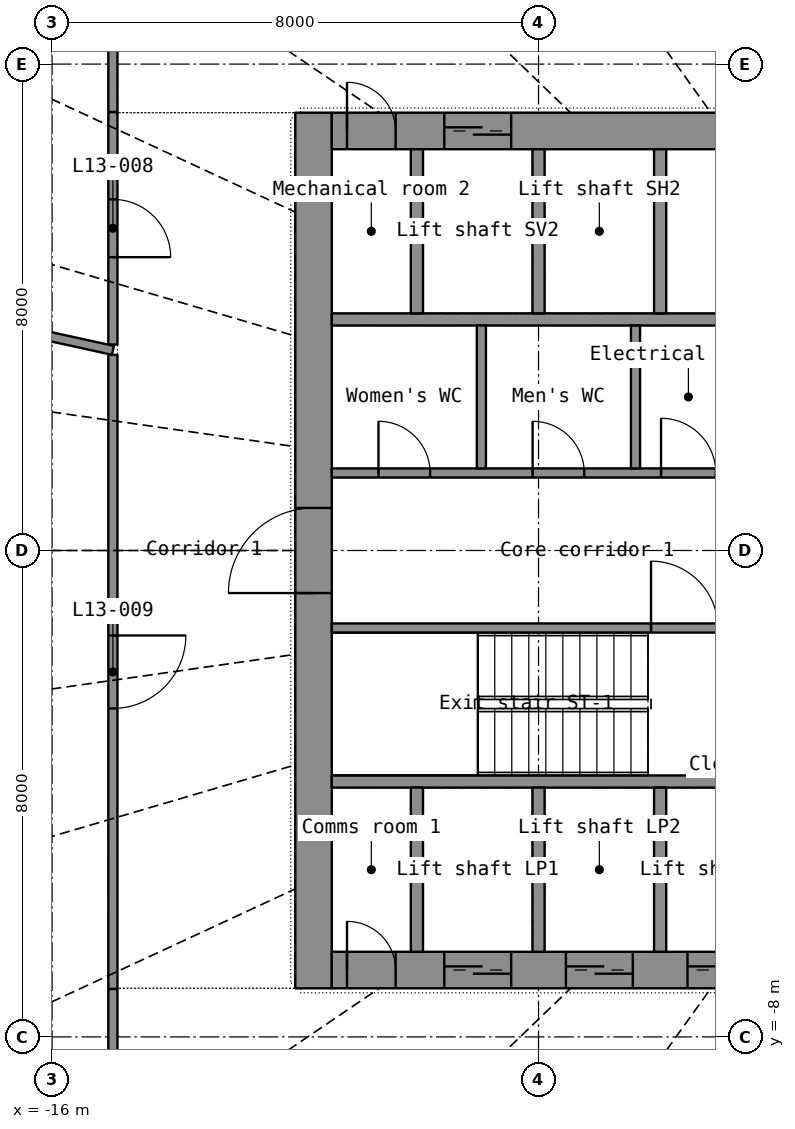
"""IFC4 building model, lengths in metres.
Left out: names, types, materials, properties, quantities, classifications, styles, units other than length and angle.
Written with IfcOpenShell. Run it as: python <this file> out.ifc"""

import sys

from ifc_helpers import new_model, si_unit, direction, frame, frame_2d, origin, place, context, subcontext, project, spatial, rectangle, extrude, element, fill, save


model = new_model("IFC4")
c1 = context("Model", 3, precision=1e-05, world=origin(), true_north=direction((0.0, 1.0)))
c2 = subcontext(c1, "Body", "Model", "MODEL_VIEW")
j1 = project(units=[si_unit("LENGTHUNIT", "METRE"), si_unit("PLANEANGLEUNIT", "RADIAN")], contexts=[c1])
p1 = place(None, origin())
s1 = spatial("IfcSite", under=j1, at=p1, CompositionType="ELEMENT")
p2 = place(p1, origin())
s2 = spatial("IfcBuilding", under=s1, at=p2, CompositionType="ELEMENT")
p3 = place(p2, frame((0.0, 0.0, 59.3)))
s3 = spatial("IfcBuildingStorey", under=s2, at=p3, CompositionType="ELEMENT", Elevation=59.3)
p4 = place(p3, frame((-11.7, -7.2, 0.0), z_axis=(0.0, 0.0, 1.0), x_axis=(0.0, 1.0, 0.0)))
e1 = element("IfcWall", 1, at=p4, inside=s3, PredefinedType="SHEAR", context=c2, shape_type="SweptSolid", body=[
    extrude(rectangle(XDim=14.4, YDim=0.6, at=frame_2d((7.2, 0.0))), origin(), (0.0, 0.0, 1.0), 3.3),
])
p5 = place(p4, frame((6.5, 0.0, 0.0)))
e2 = element("IfcOpeningElement", 2, at=p5, cuts=e1, PredefinedType="OPENING", context=c2, shape_type="SweptSolid", body=[
    extrude(rectangle(XDim=1.4, YDim=2.2, at=frame_2d((0.7, 1.1))), frame((0.0, 0.31, 0.0), z_axis=(0.0, -1.0, 0.0), x_axis=(1.0, 0.0, 0.0)), (0.0, 0.0, 1.0), 0.62),
])
p6 = place(p3, frame((-11.4, -6.9, 0.0), z_axis=(0.0, 0.0, 1.0), x_axis=(1.0, 0.0, 0.0)))
e3 = element("IfcWall", 3, at=p6, inside=s3, PredefinedType="SHEAR", context=c2, shape_type="SweptSolid", body=[
    extrude(rectangle(XDim=22.8, YDim=0.6, at=frame_2d((11.4, 0.0))), origin(), (0.0, 0.0, 1.0), 3.3),
])
p7 = place(p6, frame((1.85, 0.0, 0.0)))
e4 = element("IfcOpeningElement", 4, at=p7, cuts=e3, PredefinedType="OPENING", context=c2, shape_type="SweptSolid", body=[
    extrude(rectangle(XDim=1.1, YDim=2.2, at=frame_2d((0.55, 1.1))), frame((0.0, 0.31, 0.0), z_axis=(0.0, -1.0, 0.0), x_axis=(1.0, 0.0, 0.0)), (0.0, 0.0, 1.0), 0.62),
])
p8 = place(p6, frame((3.85, 0.0, 0.0)))
e5 = element("IfcOpeningElement", 5, at=p8, cuts=e3, PredefinedType="OPENING", context=c2, shape_type="SweptSolid", body=[
    extrude(rectangle(XDim=1.1, YDim=2.2, at=frame_2d((0.55, 1.1))), frame((0.0, 0.31, 0.0), z_axis=(0.0, -1.0, 0.0), x_axis=(1.0, 0.0, 0.0)), (0.0, 0.0, 1.0), 0.62),
])
p9 = place(p6, frame((5.85, 0.0, 0.0)))
e6 = element("IfcOpeningElement", 6, at=p9, cuts=e3, PredefinedType="OPENING", context=c2, shape_type="SweptSolid", body=[
    extrude(rectangle(XDim=1.1, YDim=2.2, at=frame_2d((0.55, 1.1))), frame((0.0, 0.31, 0.0), z_axis=(0.0, -1.0, 0.0), x_axis=(1.0, 0.0, 0.0)), (0.0, 0.0, 1.0), 0.62),
])
p10 = place(p6, frame((7.85, 0.0, 0.0)))
e7 = element("IfcOpeningElement", 7, at=p10, cuts=e3, PredefinedType="OPENING", context=c2, shape_type="SweptSolid", body=[
    extrude(rectangle(XDim=1.1, YDim=2.2, at=frame_2d((0.55, 1.1))), frame((0.0, 0.31, 0.0), z_axis=(0.0, -1.0, 0.0), x_axis=(1.0, 0.0, 0.0)), (0.0, 0.0, 1.0), 0.62),
])
p11 = place(p6, frame((9.85, 0.0, 0.0)))
e8 = element("IfcOpeningElement", 8, at=p11, cuts=e3, PredefinedType="OPENING", context=c2, shape_type="SweptSolid", body=[
    extrude(rectangle(XDim=1.1, YDim=2.2, at=frame_2d((0.55, 1.1))), frame((0.0, 0.31, 0.0), z_axis=(0.0, -1.0, 0.0), x_axis=(1.0, 0.0, 0.0)), (0.0, 0.0, 1.0), 0.62),
])
p12 = place(p6, frame((11.85, 0.0, 0.0)))
e9 = element("IfcOpeningElement", 9, at=p12, cuts=e3, PredefinedType="OPENING", context=c2, shape_type="SweptSolid", body=[
    extrude(rectangle(XDim=1.1, YDim=2.2, at=frame_2d((0.55, 1.1))), frame((0.0, 0.31, 0.0), z_axis=(0.0, -1.0, 0.0), x_axis=(1.0, 0.0, 0.0)), (0.0, 0.0, 1.0), 0.62),
])
p13 = place(p6, frame((13.85, 0.0, 0.0)))
e10 = element("IfcOpeningElement", 10, at=p13, cuts=e3, PredefinedType="OPENING", context=c2, shape_type="SweptSolid", body=[
    extrude(rectangle(XDim=1.1, YDim=2.2, at=frame_2d((0.55, 1.1))), frame((0.0, 0.31, 0.0), z_axis=(0.0, -1.0, 0.0), x_axis=(1.0, 0.0, 0.0)), (0.0, 0.0, 1.0), 0.62),
])
p14 = place(p6, frame((15.85, 0.0, 0.0)))
e11 = element("IfcOpeningElement", 11, at=p14, cuts=e3, PredefinedType="OPENING", context=c2, shape_type="SweptSolid", body=[
    extrude(rectangle(XDim=1.1, YDim=2.2, at=frame_2d((0.55, 1.1))), frame((0.0, 0.31, 0.0), z_axis=(0.0, -1.0, 0.0), x_axis=(1.0, 0.0, 0.0)), (0.0, 0.0, 1.0), 0.62),
])
p15 = place(p6, frame((19.85, 0.0, 0.0)))
e12 = element("IfcOpeningElement", 12, at=p15, cuts=e3, PredefinedType="OPENING", context=c2, shape_type="SweptSolid", body=[
    extrude(rectangle(XDim=1.1, YDim=2.2, at=frame_2d((0.55, 1.1))), frame((0.0, 0.31, 0.0), z_axis=(0.0, -1.0, 0.0), x_axis=(1.0, 0.0, 0.0)), (0.0, 0.0, 1.0), 0.62),
])
p16 = place(p6, frame((0.25, 0.0, 0.0)))
e13 = element("IfcOpeningElement", 13, at=p16, cuts=e3, PredefinedType="OPENING", context=c2, shape_type="SweptSolid", body=[
    extrude(rectangle(XDim=0.8, YDim=2.05, at=frame_2d((0.4, 1.025))), frame((0.0, 0.31, 0.0), z_axis=(0.0, -1.0, 0.0), x_axis=(1.0, 0.0, 0.0)), (0.0, 0.0, 1.0), 0.62),
])
p17 = place(p6, frame((21.75, 0.0, 0.0)))
e14 = element("IfcOpeningElement", 14, at=p17, cuts=e3, PredefinedType="OPENING", context=c2, shape_type="SweptSolid", body=[
    extrude(rectangle(XDim=0.8, YDim=2.05, at=frame_2d((0.4, 1.025))), frame((0.0, 0.31, 0.0), z_axis=(0.0, -1.0, 0.0), x_axis=(1.0, 0.0, 0.0)), (0.0, 0.0, 1.0), 0.62),
])
p18 = place(p3, frame((-11.4, 6.9, 0.0), z_axis=(0.0, 0.0, 1.0), x_axis=(1.0, 0.0, 0.0)))
e15 = element("IfcWall", 15, at=p18, inside=s3, PredefinedType="SHEAR", context=c2, shape_type="SweptSolid", body=[
    extrude(rectangle(XDim=22.8, YDim=0.6, at=frame_2d((11.4, 0.0))), origin(), (0.0, 0.0, 1.0), 3.3),
])
p19 = place(p18, frame((1.85, 0.0, 0.0)))
e16 = element("IfcOpeningElement", 16, at=p19, cuts=e15, PredefinedType="OPENING", context=c2, shape_type="SweptSolid", body=[
    extrude(rectangle(XDim=1.1, YDim=2.2, at=frame_2d((0.55, 1.1))), frame((0.0, 0.31, 0.0), z_axis=(0.0, -1.0, 0.0), x_axis=(1.0, 0.0, 0.0)), (0.0, 0.0, 1.0), 0.62),
])
p20 = place(p18, frame((8.95, 0.0, 0.0)))
e17 = element("IfcOpeningElement", 17, at=p20, cuts=e15, PredefinedType="OPENING", context=c2, shape_type="SweptSolid", body=[
    extrude(rectangle(XDim=0.9, YDim=2.1, at=frame_2d((0.45, 1.05))), frame((0.0, 0.31, 0.0), z_axis=(0.0, -1.0, 0.0), x_axis=(1.0, 0.0, 0.0)), (0.0, 0.0, 1.0), 0.62),
])
p21 = place(p18, frame((14.95, 0.0, 0.0)))
e18 = element("IfcOpeningElement", 18, at=p21, cuts=e15, PredefinedType="OPENING", context=c2, shape_type="SweptSolid", body=[
    extrude(rectangle(XDim=0.9, YDim=2.1, at=frame_2d((0.45, 1.05))), frame((0.0, 0.31, 0.0), z_axis=(0.0, -1.0, 0.0), x_axis=(1.0, 0.0, 0.0)), (0.0, 0.0, 1.0), 0.62),
])
p22 = place(p18, frame((18.95, 0.0, 0.0)))
e19 = element("IfcOpeningElement", 19, at=p22, cuts=e15, PredefinedType="OPENING", context=c2, shape_type="SweptSolid", body=[
    extrude(rectangle(XDim=0.9, YDim=2.1, at=frame_2d((0.45, 1.05))), frame((0.0, 0.31, 0.0), z_axis=(0.0, -1.0, 0.0), x_axis=(1.0, 0.0, 0.0)), (0.0, 0.0, 1.0), 0.62),
])
p23 = place(p18, frame((0.25, 0.0, 0.0)))
e20 = element("IfcOpeningElement", 20, at=p23, cuts=e15, PredefinedType="OPENING", context=c2, shape_type="SweptSolid", body=[
    extrude(rectangle(XDim=0.8, YDim=2.05, at=frame_2d((0.4, 1.025))), frame((0.0, 0.31, 0.0), z_axis=(0.0, -1.0, 0.0), x_axis=(1.0, 0.0, 0.0)), (0.0, 0.0, 1.0), 0.62),
])
p24 = place(p18, frame((21.75, 0.0, 0.0)))
e21 = element("IfcOpeningElement", 21, at=p24, cuts=e15, PredefinedType="OPENING", context=c2, shape_type="SweptSolid", body=[
    extrude(rectangle(XDim=0.8, YDim=2.05, at=frame_2d((0.4, 1.025))), frame((0.0, 0.31, 0.0), z_axis=(0.0, -1.0, 0.0), x_axis=(1.0, 0.0, 0.0)), (0.0, 0.0, 1.0), 0.62),
])
for number, where, z_axis, x_axis in (
    (22, (-11.4, -3.8, 0.0), (0.0, 0.0, 1.0), (1.0, 0.0, 0.0)),
    (23, (-11.4, 3.8, 0.0), (0.0, 0.0, 1.0), (1.0, 0.0, 0.0)),
):
    element("IfcWall", number, at=place(p3, frame(where, z_axis=z_axis, x_axis=x_axis)), inside=s3, PredefinedType="SHEAR", context=c2, shape_type="SweptSolid", body=[
        extrude(rectangle(XDim=22.8, YDim=0.2, at=frame_2d((11.4, 0.0))), origin(), (0.0, 0.0, 1.0), 3.3),
    ])
for number, where, z_axis, x_axis in (
    (24, (-10.0, -6.6, 0.0), (0.0, 0.0, 1.0), (0.0, 1.0, 0.0)),
    (25, (-8.0, -6.6, 0.0), (0.0, 0.0, 1.0), (0.0, 1.0, 0.0)),
    (26, (-6.0, -6.6, 0.0), (0.0, 0.0, 1.0), (0.0, 1.0, 0.0)),
    (27, (-10.0, 3.9, 0.0), (0.0, 0.0, 1.0), (0.0, 1.0, 0.0)),
    (28, (-8.0, 3.9, 0.0), (0.0, 0.0, 1.0), (0.0, 1.0, 0.0)),
    (29, (-6.0, 3.9, 0.0), (0.0, 0.0, 1.0), (0.0, 1.0, 0.0)),
):
    element("IfcWall", number, at=place(p3, frame(where, z_axis=z_axis, x_axis=x_axis)), inside=s3, PredefinedType="SHEAR", context=c2, shape_type="SweptSolid", body=[
        extrude(rectangle(XDim=2.7, YDim=0.2, at=frame_2d((1.35, 0.0))), origin(), (0.0, 0.0, 1.0), 3.3),
    ])
p25 = place(p3, frame((-11.4, -1.275, 0.0), z_axis=(0.0, 0.0, 1.0), x_axis=(1.0, 0.0, 0.0)))
e30 = element("IfcWall", 30, at=p25, inside=s3, PredefinedType="SHEAR", context=c2, shape_type="SweptSolid", body=[
    extrude(rectangle(XDim=8.4, YDim=0.15, at=frame_2d((4.2, 0.0))), origin(), (0.0, 0.0, 1.0), 3.3),
])
p26 = place(p25, frame((5.25, 0.0, 0.0)))
e31 = element("IfcOpeningElement", 31, at=p26, cuts=e30, PredefinedType="OPENING", context=c2, shape_type="SweptSolid", body=[
    extrude(rectangle(XDim=1.1, YDim=2.15, at=frame_2d((0.55, 1.075))), frame((0.0, 0.085, 0.0), z_axis=(0.0, -1.0, 0.0), x_axis=(1.0, 0.0, 0.0)), (0.0, 0.0, 1.0), 0.17),
])
p27 = place(p25, frame((7.05, 0.0, 0.0)))
e32 = element("IfcOpeningElement", 32, at=p27, cuts=e30, PredefinedType="OPENING", context=c2, shape_type="SweptSolid", body=[
    extrude(rectangle(XDim=0.9, YDim=2.1, at=frame_2d((0.45, 1.05))), frame((0.0, 0.085, 0.0), z_axis=(0.0, -1.0, 0.0), x_axis=(1.0, 0.0, 0.0)), (0.0, 0.0, 1.0), 0.17),
])
p28 = place(p3, frame((-11.4, 1.275, 0.0), z_axis=(0.0, 0.0, 1.0), x_axis=(1.0, 0.0, 0.0)))
e33 = element("IfcWall", 33, at=p28, inside=s3, PredefinedType="PARTITIONING", context=c2, shape_type="SweptSolid", body=[
    extrude(rectangle(XDim=8.4, YDim=0.15, at=frame_2d((4.2, 0.0))), origin(), (0.0, 0.0, 1.0), 3.3),
])
p29 = place(p28, frame((0.768, 0.0, 0.0)))
e34 = element("IfcOpeningElement", 34, at=p29, cuts=e33, PredefinedType="OPENING", context=c2, shape_type="SweptSolid", body=[
    extrude(rectangle(XDim=0.85, YDim=2.1, at=frame_2d((0.425, 1.05))), frame((0.0, 0.085, 0.0), z_axis=(0.0, -1.0, 0.0), x_axis=(1.0, 0.0, 0.0)), (0.0, 0.0, 1.0), 0.17),
])
p30 = place(p28, frame((3.302, 0.0, 0.0)))
e35 = element("IfcOpeningElement", 35, at=p30, cuts=e33, PredefinedType="OPENING", context=c2, shape_type="SweptSolid", body=[
    extrude(rectangle(XDim=0.85, YDim=2.1, at=frame_2d((0.425, 1.05))), frame((0.0, 0.085, 0.0), z_axis=(0.0, -1.0, 0.0), x_axis=(1.0, 0.0, 0.0)), (0.0, 0.0, 1.0), 0.17),
])
p31 = place(p28, frame((5.415, 0.0, 0.0)))
e36 = element("IfcOpeningElement", 36, at=p31, cuts=e33, PredefinedType="OPENING", context=c2, shape_type="SweptSolid", body=[
    extrude(rectangle(XDim=0.9, YDim=2.1, at=frame_2d((0.45, 1.05))), frame((0.0, 0.085, 0.0), z_axis=(0.0, -1.0, 0.0), x_axis=(1.0, 0.0, 0.0)), (0.0, 0.0, 1.0), 0.17),
])
p32 = place(p28, frame((7.155, 0.0, 0.0)))
e37 = element("IfcOpeningElement", 37, at=p32, cuts=e33, PredefinedType="OPENING", context=c2, shape_type="SweptSolid", body=[
    extrude(rectangle(XDim=0.9, YDim=2.1, at=frame_2d((0.45, 1.05))), frame((0.0, 0.085, 0.0), z_axis=(0.0, -1.0, 0.0), x_axis=(1.0, 0.0, 0.0)), (0.0, 0.0, 1.0), 0.17),
])
for number, where, z_axis, x_axis in (
    (38, (-8.94, 1.35, 0.0), (0.0, 0.0, 1.0), (0.0, 1.0, 0.0)),
    (39, (-6.405, 1.35, 0.0), (0.0, 0.0, 1.0), (0.0, 1.0, 0.0)),
):
    element("IfcWall", number, at=place(p3, frame(where, z_axis=z_axis, x_axis=x_axis)), inside=s3, PredefinedType="PARTITIONING", context=c2, shape_type="SweptSolid", body=[
        extrude(rectangle(XDim=2.35, YDim=0.15, at=frame_2d((1.175, 0.0))), origin(), (0.0, 0.0, 1.0), 3.3),
    ])
p33 = place(p3, frame((-26.25, 5.761, 0.0), z_axis=(0.0, 0.0, 1.0), x_axis=(0.976751272, -0.214375729, 0.0)))
e40 = element("IfcWall", 40, at=p33, inside=s3, PredefinedType="PARTITIONING", context=c2, shape_type="SweptSolid", body=[
    extrude(rectangle(XDim=11.518, YDim=0.15, at=frame_2d((5.759, 0.0))), origin(), (0.0, 0.0, 1.0), 2.4),
])
p34 = place(p3, frame((-15.0, 3.217, 0.0), z_axis=(0.0, 0.0, 1.0), x_axis=(0.0, -1.0, 0.0)))
e41 = element("IfcWall", 41, at=p34, inside=s3, PredefinedType="PARTITIONING", context=c2, shape_type="SweptSolid", body=[
    extrude(rectangle(XDim=10.429, YDim=0.15, at=frame_2d((5.214, 0.0))), origin(), (0.0, 0.0, 1.0), 2.4),
])
p35 = place(p34, frame((4.615, 0.0, 0.0)))
e42 = element("IfcOpeningElement", 42, at=p35, cuts=e41, PredefinedType="OPENING", context=c2, shape_type="SweptSolid", body=[
    extrude(rectangle(XDim=1.2, YDim=2.2, at=frame_2d((0.6, 1.1))), frame((0.0, 0.085, 0.0), z_axis=(0.0, -1.0, 0.0), x_axis=(1.0, 0.0, 0.0)), (0.0, 0.0, 1.0), 0.17),
])
p36 = place(p3, frame((-15.0, 7.212, 0.0), z_axis=(0.0, 0.0, 1.0), x_axis=(0.0, -1.0, 0.0)))
e43 = element("IfcWall", 43, at=p36, inside=s3, PredefinedType="PARTITIONING", context=c2, shape_type="SweptSolid", body=[
    extrude(rectangle(XDim=3.824, YDim=0.15, at=frame_2d((1.912, 0.0))), origin(), (0.0, 0.0, 1.0), 2.4),
])
p37 = place(p36, frame((1.437, 0.0, 0.0)))
e44 = element("IfcOpeningElement", 44, at=p37, cuts=e43, PredefinedType="OPENING", context=c2, shape_type="SweptSolid", body=[
    extrude(rectangle(XDim=0.95, YDim=2.15, at=frame_2d((0.475, 1.075))), frame((0.0, 0.085, 0.0), z_axis=(0.0, -1.0, 0.0), x_axis=(1.0, 0.0, 0.0)), (0.0, 0.0, 1.0), 0.17),
])
p38 = place(p3, frame((-15.0, 10.8, 0.0), z_axis=(0.0, 0.0, 1.0), x_axis=(0.0, -1.0, 0.0)))
e45 = element("IfcWall", 45, at=p38, inside=s3, PredefinedType="PARTITIONING", context=c2, shape_type="SweptSolid", body=[
    extrude(rectangle(XDim=3.587, YDim=0.15, at=frame_2d((1.793, 0.0))), origin(), (0.0, 0.0, 1.0), 2.4),
])
p39 = place(p3, frame((-15.0, -7.213, 0.0), z_axis=(0.0, 0.0, 1.0), x_axis=(0.0, -1.0, 0.0)))
e46 = element("IfcWall", 46, at=p39, inside=s3, PredefinedType="PARTITIONING", context=c2, shape_type="SweptSolid", body=[
    extrude(rectangle(XDim=2.31, YDim=0.15, at=frame_2d((1.155, 0.0))), origin(), (0.0, 0.0, 1.0), 2.4),
])
p40 = place(p7, origin())
e47 = element("IfcDoor", 47, at=p40, inside=s3, OperationType="DOUBLE_DOOR_SLIDING", PredefinedType="DOOR", context=c2, shape_type="SweptSolid", body=[
    extrude(rectangle(XDim=1.1, YDim=2.2, at=frame_2d((0.55, 1.1))), frame((0.0, 0.025, 0.0), z_axis=(0.0, -1.0, 0.0), x_axis=(1.0, 0.0, 0.0)), (0.0, 0.0, 1.0), 0.05),
])
fill(e4, e47)
p41 = place(p8, origin())
e48 = element("IfcDoor", 48, at=p41, inside=s3, OperationType="DOUBLE_DOOR_SLIDING", PredefinedType="DOOR", context=c2, shape_type="SweptSolid", body=[
    extrude(rectangle(XDim=1.1, YDim=2.2, at=frame_2d((0.55, 1.1))), frame((0.0, 0.025, 0.0), z_axis=(0.0, -1.0, 0.0), x_axis=(1.0, 0.0, 0.0)), (0.0, 0.0, 1.0), 0.05),
])
fill(e5, e48)
p42 = place(p9, origin())
e49 = element("IfcDoor", 49, at=p42, inside=s3, OperationType="DOUBLE_DOOR_SLIDING", PredefinedType="DOOR", context=c2, shape_type="SweptSolid", body=[
    extrude(rectangle(XDim=1.1, YDim=2.2, at=frame_2d((0.55, 1.1))), frame((0.0, 0.025, 0.0), z_axis=(0.0, -1.0, 0.0), x_axis=(1.0, 0.0, 0.0)), (0.0, 0.0, 1.0), 0.05),
])
fill(e6, e49)
p43 = place(p16, origin())
e50 = element("IfcDoor", 50, at=p43, inside=s3, OperationType="SINGLE_SWING_LEFT", PredefinedType="DOOR", context=c2, shape_type="SweptSolid", body=[
    extrude(rectangle(XDim=0.8, YDim=2.05, at=frame_2d((0.4, 1.025))), frame((0.0, 0.025, 0.0), z_axis=(0.0, -1.0, 0.0), x_axis=(1.0, 0.0, 0.0)), (0.0, 0.0, 1.0), 0.05),
])
fill(e13, e50)
p44 = place(p19, origin())
e51 = element("IfcDoor", 51, at=p44, inside=s3, OperationType="DOUBLE_DOOR_SLIDING", PredefinedType="DOOR", context=c2, shape_type="SweptSolid", body=[
    extrude(rectangle(XDim=1.1, YDim=2.2, at=frame_2d((0.55, 1.1))), frame((0.0, 0.025, 0.0), z_axis=(0.0, -1.0, 0.0), x_axis=(1.0, 0.0, 0.0)), (0.0, 0.0, 1.0), 0.05),
])
fill(e16, e51)
p45 = place(p23, origin())
e52 = element("IfcDoor", 52, at=p45, inside=s3, OperationType="SINGLE_SWING_LEFT", PredefinedType="DOOR", context=c2, shape_type="SweptSolid", body=[
    extrude(rectangle(XDim=0.8, YDim=2.05, at=frame_2d((0.4, 1.025))), frame((0.0, 0.025, 0.0), z_axis=(0.0, -1.0, 0.0), x_axis=(1.0, 0.0, 0.0)), (0.0, 0.0, 1.0), 0.05),
])
fill(e20, e52)
p46 = place(p5, origin())
e53 = element("IfcDoor", 53, at=p46, inside=s3, OperationType="DOUBLE_DOOR_SINGLE_SWING", PredefinedType="DOOR", context=c2, shape_type="SweptSolid", body=[
    extrude(rectangle(XDim=1.4, YDim=2.2, at=frame_2d((0.7, 1.1))), frame((0.0, 0.025, 0.0), z_axis=(0.0, -1.0, 0.0), x_axis=(1.0, 0.0, 0.0)), (0.0, 0.0, 1.0), 0.05),
])
fill(e2, e53)
p47 = place(p26, origin())
e54 = element("IfcDoor", 54, at=p47, inside=s3, OperationType="SINGLE_SWING_LEFT", PredefinedType="DOOR", context=c2, shape_type="SweptSolid", body=[
    extrude(rectangle(XDim=1.1, YDim=2.15, at=frame_2d((0.55, 1.075))), frame((0.0, 0.025, 0.0), z_axis=(0.0, -1.0, 0.0), x_axis=(1.0, 0.0, 0.0)), (0.0, 0.0, 1.0), 0.05),
])
fill(e31, e54)
p48 = place(p29, origin())
e55 = element("IfcDoor", 55, at=p48, inside=s3, OperationType="SINGLE_SWING_LEFT", PredefinedType="DOOR", context=c2, shape_type="SweptSolid", body=[
    extrude(rectangle(XDim=0.85, YDim=2.1, at=frame_2d((0.425, 1.05))), frame((0.0, 0.025, 0.0), z_axis=(0.0, -1.0, 0.0), x_axis=(1.0, 0.0, 0.0)), (0.0, 0.0, 1.0), 0.05),
])
fill(e34, e55)
p49 = place(p30, origin())
e56 = element("IfcDoor", 56, at=p49, inside=s3, OperationType="SINGLE_SWING_LEFT", PredefinedType="DOOR", context=c2, shape_type="SweptSolid", body=[
    extrude(rectangle(XDim=0.85, YDim=2.1, at=frame_2d((0.425, 1.05))), frame((0.0, 0.025, 0.0), z_axis=(0.0, -1.0, 0.0), x_axis=(1.0, 0.0, 0.0)), (0.0, 0.0, 1.0), 0.05),
])
fill(e35, e56)
p50 = place(p31, origin())
e57 = element("IfcDoor", 57, at=p50, inside=s3, OperationType="SINGLE_SWING_LEFT", PredefinedType="DOOR", context=c2, shape_type="SweptSolid", body=[
    extrude(rectangle(XDim=0.9, YDim=2.1, at=frame_2d((0.45, 1.05))), frame((0.0, 0.025, 0.0), z_axis=(0.0, -1.0, 0.0), x_axis=(1.0, 0.0, 0.0)), (0.0, 0.0, 1.0), 0.05),
])
fill(e36, e57)
p51 = place(p37, origin())
e58 = element("IfcDoor", 58, at=p51, inside=s3, OperationType="SINGLE_SWING_RIGHT", PredefinedType="DOOR", context=c2, shape_type="SweptSolid", body=[
    extrude(rectangle(XDim=0.95, YDim=2.15, at=frame_2d((0.475, 1.075))), frame((0.0, 0.025, 0.0), z_axis=(0.0, -1.0, 0.0), x_axis=(1.0, 0.0, 0.0)), (0.0, 0.0, 1.0), 0.05),
])
fill(e44, e58)
p52 = place(p35, origin())
e59 = element("IfcDoor", 59, at=p52, inside=s3, OperationType="DOUBLE_DOOR_SINGLE_SWING", PredefinedType="DOOR", context=c2, shape_type="SweptSolid", body=[
    extrude(rectangle(XDim=1.2, YDim=2.2, at=frame_2d((0.6, 1.1))), frame((0.0, 0.025, 0.0), z_axis=(0.0, -1.0, 0.0), x_axis=(1.0, 0.0, 0.0)), (0.0, 0.0, 1.0), 0.05),
])
fill(e42, e59)
save(model, sys.argv[1])
